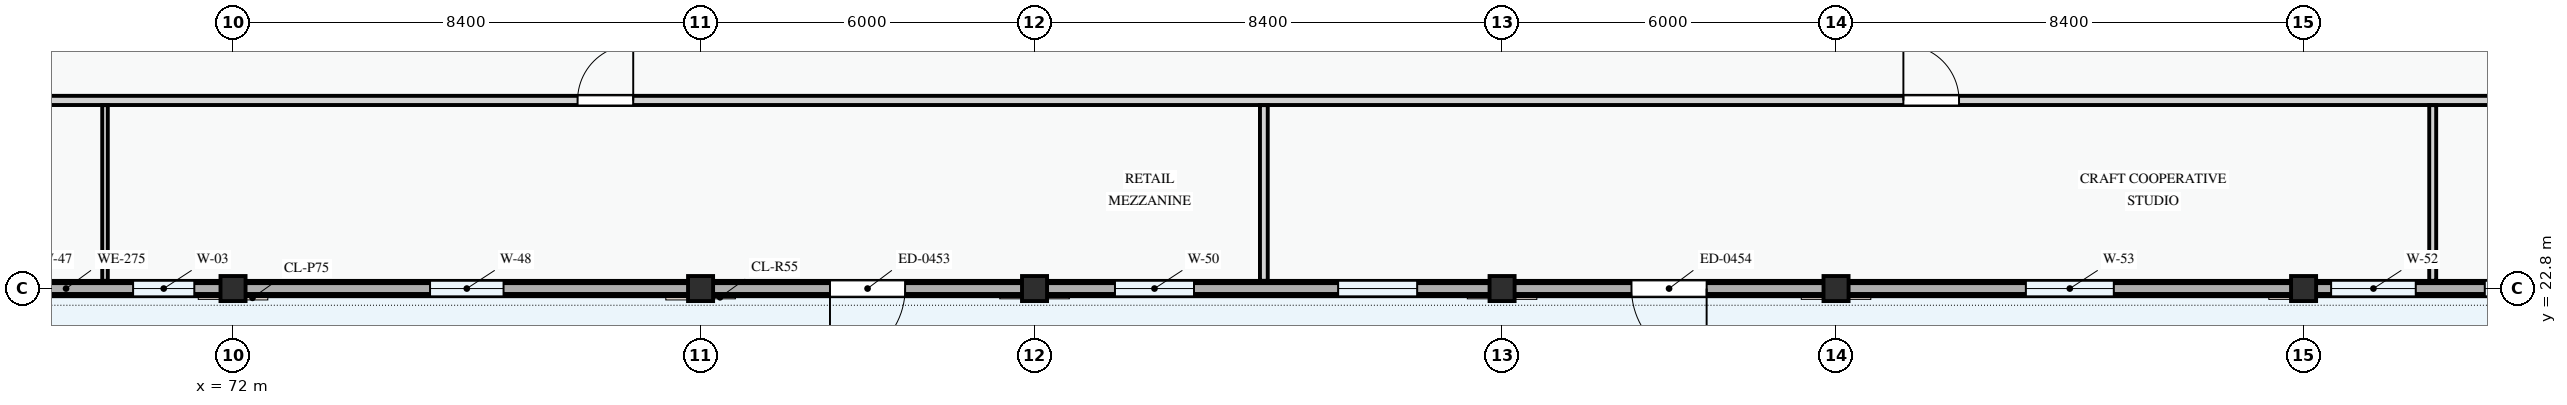
"""IFC4 building model, lengths in metres.
Left out: names, types, materials, properties, quantities, classifications, styles, units other than length and angle.
Written with IfcOpenShell. Run it as: python <this file> out.ifc"""

import sys

from ifc_helpers import new_model, si_unit, direction, frame, frame_2d, origin, origin_2d, place, context, subcontext, project, spatial, rectangle, extrude, element, fill, save


model = new_model("IFC4")
c1 = context("Model", 3, precision=1e-05, world=origin(), true_north=direction((0.0, 1.0)))
c2 = subcontext(c1, "Body", "Model", "MODEL_VIEW")
j1 = project(units=[si_unit("LENGTHUNIT", "METRE"), si_unit("PLANEANGLEUNIT", "RADIAN")], contexts=[c1])
p1 = place(None, origin())
s1 = spatial("IfcSite", under=j1, at=p1, CompositionType="ELEMENT")
p2 = place(p1, origin())
s2 = spatial("IfcBuilding", under=s1, at=p2, CompositionType="ELEMENT")
p3 = place(p2, frame((0.0, 0.0, 4.5)))
s3 = spatial("IfcBuildingStorey", under=s2, at=p3, CompositionType="ELEMENT", Elevation=4.5)
for number, where, z_axis, x_axis in (
    (1, (72.0, 22.8, 0.0), (0.0, 0.0, 1.0), (1.0, 0.0, 0.0)),
    (2, (80.4, 22.8, 0.0), (0.0, 0.0, 1.0), (1.0, 0.0, 0.0)),
    (3, (86.4, 22.8, 0.0), (0.0, 0.0, 1.0), (1.0, 0.0, 0.0)),
    (4, (94.8, 22.8, 0.0), (0.0, 0.0, 1.0), (1.0, 0.0, 0.0)),
    (5, (100.8, 22.8, 0.0), (0.0, 0.0, 1.0), (1.0, 0.0, 0.0)),
    (6, (109.2, 22.8, 0.0), (0.0, 0.0, 1.0), (1.0, 0.0, 0.0)),
):
    element("IfcColumn", number, at=place(p3, frame(where, z_axis=z_axis, x_axis=x_axis)), inside=s3, PredefinedType="COLUMN", context=c2, shape_type="SweptSolid", body=[
        extrude(rectangle(XDim=0.45, YDim=0.45, at=origin_2d()), origin(), (0.0, 0.0, 1.0), 3.6),
    ])
p4 = place(p3, frame((66.0, 22.8, 0.0), z_axis=(0.0, 0.0, 1.0), x_axis=(1.0, 0.0, 0.0)))
e7 = element("IfcWall", 7, at=p4, inside=s3, PredefinedType="STANDARD", context=c2, shape_type="SweptSolid", body=[
    extrude(rectangle(XDim=6.0, YDim=0.275, at=frame_2d((3.0, 0.0))), origin(), (0.0, 0.0, 1.0), 2.775),
])
p5 = place(p4, frame((1.32, 0.0, 0.8)))
e8 = element("IfcOpeningElement", 8, at=p5, cuts=e7, PredefinedType="OPENING", context=c2, shape_type="SweptSolid", body=[
    extrude(rectangle(XDim=1.25, YDim=1.45, at=frame_2d((0.625, 0.725))), frame((0.0, 0.147, 0.0), z_axis=(0.0, -1.0, 0.0), x_axis=(1.0, 0.0, 0.0)), (0.0, 0.0, 1.0), 0.295),
])
p6 = place(p4, frame((4.205, 0.0, 0.8)))
e9 = element("IfcOpeningElement", 9, at=p6, cuts=e7, PredefinedType="OPENING", context=c2, shape_type="SweptSolid", body=[
    extrude(rectangle(XDim=1.1, YDim=1.3, at=frame_2d((0.55, 0.65))), frame((0.0, 0.147, 0.0), z_axis=(0.0, -1.0, 0.0), x_axis=(1.0, 0.0, 0.0)), (0.0, 0.0, 1.0), 0.295),
])
p7 = place(p3, frame((72.0, 22.8, 0.0), z_axis=(0.0, 0.0, 1.0), x_axis=(1.0, 0.0, 0.0)))
e10 = element("IfcWall", 10, at=p7, inside=s3, PredefinedType="STANDARD", context=c2, shape_type="SweptSolid", body=[
    extrude(rectangle(XDim=8.4, YDim=0.275, at=frame_2d((4.2, 0.0))), origin(), (0.0, 0.0, 1.0), 2.675),
])
p8 = place(p7, frame((3.54, 0.0, 0.8)))
e11 = element("IfcOpeningElement", 11, at=p8, cuts=e10, PredefinedType="OPENING", context=c2, shape_type="SweptSolid", body=[
    extrude(rectangle(XDim=1.32, YDim=1.35, at=frame_2d((0.66, 0.675))), frame((0.0, 0.147, 0.0), z_axis=(0.0, -1.0, 0.0), x_axis=(1.0, 0.0, 0.0)), (0.0, 0.0, 1.0), 0.295),
])
p9 = place(p3, frame((80.4, 22.8, 0.0), z_axis=(0.0, 0.0, 1.0), x_axis=(1.0, 0.0, 0.0)))
e12 = element("IfcWall", 12, at=p9, inside=s3, PredefinedType="STANDARD", context=c2, shape_type="SweptSolid", body=[
    extrude(rectangle(XDim=6.0, YDim=0.275, at=frame_2d((3.0, 0.0))), origin(), (0.0, 0.0, 1.0), 2.775),
])
p10 = place(p9, frame((2.325, 0.0, 0.0)))
e13 = element("IfcOpeningElement", 13, at=p10, cuts=e12, PredefinedType="OPENING", context=c2, shape_type="SweptSolid", body=[
    extrude(rectangle(XDim=1.35, YDim=2.2, at=frame_2d((0.675, 1.1))), frame((0.0, 0.147, 0.0), z_axis=(0.0, -1.0, 0.0), x_axis=(1.0, 0.0, 0.0)), (0.0, 0.0, 1.0), 0.295),
])
p11 = place(p3, frame((86.4, 22.8, 0.0), z_axis=(0.0, 0.0, 1.0), x_axis=(1.0, 0.0, 0.0)))
e14 = element("IfcWall", 14, at=p11, inside=s3, PredefinedType="STANDARD", context=c2, shape_type="SweptSolid", body=[
    extrude(rectangle(XDim=8.4, YDim=0.275, at=frame_2d((4.2, 0.0))), origin(), (0.0, 0.0, 1.0), 2.675),
])
p12 = place(p11, frame((1.445, 0.0, 0.8)))
e15 = element("IfcOpeningElement", 15, at=p12, cuts=e14, PredefinedType="OPENING", context=c2, shape_type="SweptSolid", body=[
    extrude(rectangle(XDim=1.42, YDim=1.38, at=frame_2d((0.71, 0.69))), frame((0.0, 0.147, 0.0), z_axis=(0.0, -1.0, 0.0), x_axis=(1.0, 0.0, 0.0)), (0.0, 0.0, 1.0), 0.295),
])
p13 = place(p11, frame((5.455, 0.0, 0.8)))
e16 = element("IfcOpeningElement", 16, at=p13, cuts=e14, PredefinedType="OPENING", context=c2, shape_type="SweptSolid", body=[
    extrude(rectangle(XDim=1.42, YDim=1.38, at=frame_2d((0.71, 0.69))), frame((0.0, 0.147, 0.0), z_axis=(0.0, -1.0, 0.0), x_axis=(1.0, 0.0, 0.0)), (0.0, 0.0, 1.0), 0.295),
])
p14 = place(p3, frame((94.8, 22.8, 0.0), z_axis=(0.0, 0.0, 1.0), x_axis=(1.0, 0.0, 0.0)))
e17 = element("IfcWall", 17, at=p14, inside=s3, PredefinedType="STANDARD", context=c2, shape_type="SweptSolid", body=[
    extrude(rectangle(XDim=6.0, YDim=0.275, at=frame_2d((3.0, 0.0))), origin(), (0.0, 0.0, 1.0), 2.775),
])
p15 = place(p14, frame((2.325, 0.0, 0.0)))
e18 = element("IfcOpeningElement", 18, at=p15, cuts=e17, PredefinedType="OPENING", context=c2, shape_type="SweptSolid", body=[
    extrude(rectangle(XDim=1.35, YDim=2.2, at=frame_2d((0.675, 1.1))), frame((0.0, 0.147, 0.0), z_axis=(0.0, -1.0, 0.0), x_axis=(1.0, 0.0, 0.0)), (0.0, 0.0, 1.0), 0.295),
])
p16 = place(p3, frame((100.8, 22.8, 0.0), z_axis=(0.0, 0.0, 1.0), x_axis=(1.0, 0.0, 0.0)))
e19 = element("IfcWall", 19, at=p16, inside=s3, PredefinedType="STANDARD", context=c2, shape_type="SweptSolid", body=[
    extrude(rectangle(XDim=8.4, YDim=0.275, at=frame_2d((4.2, 0.0))), origin(), (0.0, 0.0, 1.0), 2.675),
])
p17 = place(p16, frame((3.41, 0.0, 0.8)))
e20 = element("IfcOpeningElement", 20, at=p17, cuts=e19, PredefinedType="OPENING", context=c2, shape_type="SweptSolid", body=[
    extrude(rectangle(XDim=1.58, YDim=1.48, at=frame_2d((0.79, 0.74))), frame((0.0, 0.147, 0.0), z_axis=(0.0, -1.0, 0.0), x_axis=(1.0, 0.0, 0.0)), (0.0, 0.0, 1.0), 0.295),
])
p18 = place(p3, frame((109.2, 22.8, 0.0), z_axis=(0.0, 0.0, 1.0), x_axis=(1.0, 0.0, 0.0)))
e21 = element("IfcWall", 21, at=p18, inside=s3, PredefinedType="STANDARD", context=c2, shape_type="SweptSolid", body=[
    extrude(rectangle(XDim=6.0, YDim=0.275, at=frame_2d((3.0, 0.0))), origin(), (0.0, 0.0, 1.0), 2.775),
])
p19 = place(p18, frame((0.495, 0.0, 0.8)))
e22 = element("IfcOpeningElement", 22, at=p19, cuts=e21, PredefinedType="OPENING", context=c2, shape_type="SweptSolid", body=[
    extrude(rectangle(XDim=1.52, YDim=1.42, at=frame_2d((0.76, 0.71))), frame((0.0, 0.147, 0.0), z_axis=(0.0, -1.0, 0.0), x_axis=(1.0, 0.0, 0.0)), (0.0, 0.0, 1.0), 0.295),
])
p20 = place(p18, frame((3.255, 0.0, 0.8)))
e23 = element("IfcOpeningElement", 23, at=p20, cuts=e21, PredefinedType="OPENING", context=c2, shape_type="SweptSolid", body=[
    extrude(rectangle(XDim=1.62, YDim=1.38, at=frame_2d((0.81, 0.69))), frame((0.0, 0.147, 0.0), z_axis=(0.0, -1.0, 0.0), x_axis=(1.0, 0.0, 0.0)), (0.0, 0.0, 1.0), 0.295),
])
p21 = place(p3, frame((66.0, 22.8, 3.6), z_axis=(0.0, 0.0, 1.0), x_axis=(1.0, 0.0, 0.0)))
e24 = element("IfcWall", 24, at=p21, inside=s3, PredefinedType="PARAPET", context=c2, shape_type="SweptSolid", body=[
    extrude(rectangle(XDim=49.2, YDim=0.195, at=frame_2d((24.6, 0.0))), origin(), (0.0, 0.0, 1.0), 1.15),
])
p22 = place(p3, frame((66.139, 26.18, 0.0), z_axis=(0.0, 0.0, 1.0), x_axis=(1.0, 0.0, 0.0)))
e25 = element("IfcWall", 25, at=p22, inside=s3, PredefinedType="PARTITIONING", context=c2, shape_type="SweptSolid", body=[
    extrude(rectangle(XDim=48.921, YDim=0.165, at=frame_2d((24.46, 0.0))), origin(), (0.0, 0.0, 1.0), 3.3),
])
p23 = place(p22, frame((12.051, 0.0, 0.0)))
e26 = element("IfcOpeningElement", 26, at=p23, cuts=e25, PredefinedType="OPENING", context=c2, shape_type="SweptSolid", body=[
    extrude(rectangle(XDim=1.0, YDim=2.1, at=frame_2d((0.5, 1.05))), frame((0.0, 0.093, 0.0), z_axis=(0.0, -1.0, 0.0), x_axis=(1.0, 0.0, 0.0)), (0.0, 0.0, 1.0), 0.185),
])
p24 = place(p22, frame((35.871, 0.0, 0.0)))
e27 = element("IfcOpeningElement", 27, at=p24, cuts=e25, PredefinedType="OPENING", context=c2, shape_type="SweptSolid", body=[
    extrude(rectangle(XDim=1.0, YDim=2.1, at=frame_2d((0.5, 1.05))), frame((0.0, 0.093, 0.0), z_axis=(0.0, -1.0, 0.0), x_axis=(1.0, 0.0, 0.0)), (0.0, 0.0, 1.0), 0.185),
])
p25 = place(p3, frame((69.7, 22.939, 0.0), z_axis=(0.0, 0.0, 1.0), x_axis=(0.0, 1.0, 0.0)))
e28 = element("IfcWall", 28, at=p25, inside=s3, PredefinedType="PARTITIONING", context=c2, shape_type="SweptSolid", body=[
    extrude(rectangle(XDim=3.156, YDim=0.1, at=frame_2d((1.578, 0.0))), origin(), (0.0, 0.0, 1.0), 3.3),
])
p26 = place(p3, frame((90.52, 22.939, 0.0), z_axis=(0.0, 0.0, 1.0), x_axis=(0.0, 1.0, 0.0)))
e29 = element("IfcWall", 29, at=p26, inside=s3, PredefinedType="PARTITIONING", context=c2, shape_type="SweptSolid", body=[
    extrude(rectangle(XDim=3.156, YDim=0.14, at=frame_2d((1.578, 0.0))), origin(), (0.0, 0.0, 1.0), 3.3),
])
p27 = place(p3, frame((111.52, 22.939, 0.0), z_axis=(0.0, 0.0, 1.0), x_axis=(0.0, 1.0, 0.0)))
e30 = element("IfcWall", 30, at=p27, inside=s3, PredefinedType="PARTITIONING", context=c2, shape_type="SweptSolid", body=[
    extrude(rectangle(XDim=3.156, YDim=0.125, at=frame_2d((1.578, 0.0))), origin(), (0.0, 0.0, 1.0), 3.3),
])
p28 = place(p6, origin())
e31 = element("IfcWindow", 31, at=p28, inside=s3, PartitioningType="SINGLE_PANEL", PredefinedType="WINDOW", context=c2, shape_type="SweptSolid", body=[
    extrude(rectangle(XDim=1.1, YDim=1.3, at=frame_2d((0.55, 0.65))), frame((0.0, 0.03, 0.0), z_axis=(0.0, -1.0, 0.0), x_axis=(1.0, 0.0, 0.0)), (0.0, 0.0, 1.0), 0.06),
])
fill(e9, e31)
p29 = place(p8, origin())
e32 = element("IfcWindow", 32, at=p29, inside=s3, PartitioningType="SINGLE_PANEL", PredefinedType="WINDOW", context=c2, shape_type="SweptSolid", body=[
    extrude(rectangle(XDim=1.32, YDim=1.35, at=frame_2d((0.66, 0.675))), frame((0.0, 0.03, 0.0), z_axis=(0.0, -1.0, 0.0), x_axis=(1.0, 0.0, 0.0)), (0.0, 0.0, 1.0), 0.06),
])
fill(e11, e32)
p30 = place(p10, frame((1.35, 0.0, 0.0), z_axis=(0.0, 0.0, 1.0), x_axis=(-1.0, 0.0, 0.0)))
e33 = element("IfcDoor", 33, at=p30, inside=s3, OperationType="SINGLE_SWING_RIGHT", PredefinedType="DOOR", context=c2, shape_type="SweptSolid", body=[
    extrude(rectangle(XDim=1.35, YDim=2.2, at=frame_2d((0.675, 1.1))), frame((0.0, 0.025, 0.0), z_axis=(0.0, -1.0, 0.0), x_axis=(1.0, 0.0, 0.0)), (0.0, 0.0, 1.0), 0.05),
])
fill(e13, e33)
p31 = place(p12, origin())
e34 = element("IfcWindow", 34, at=p31, inside=s3, PartitioningType="SINGLE_PANEL", PredefinedType="WINDOW", context=c2, shape_type="SweptSolid", body=[
    extrude(rectangle(XDim=1.42, YDim=1.38, at=frame_2d((0.71, 0.69))), frame((0.0, 0.03, 0.0), z_axis=(0.0, -1.0, 0.0), x_axis=(1.0, 0.0, 0.0)), (0.0, 0.0, 1.0), 0.06),
])
fill(e15, e34)
p32 = place(p13, origin())
e35 = element("IfcWindow", 35, at=p32, inside=s3, PartitioningType="SINGLE_PANEL", PredefinedType="WINDOW", context=c2, shape_type="SweptSolid", body=[
    extrude(rectangle(XDim=1.42, YDim=1.38, at=frame_2d((0.71, 0.69))), frame((0.0, 0.03, 0.0), z_axis=(0.0, -1.0, 0.0), x_axis=(1.0, 0.0, 0.0)), (0.0, 0.0, 1.0), 0.06),
])
fill(e16, e35)
p33 = place(p15, frame((1.35, 0.0, 0.0), z_axis=(0.0, 0.0, 1.0), x_axis=(-1.0, 0.0, 0.0)))
e36 = element("IfcDoor", 36, at=p33, inside=s3, OperationType="SINGLE_SWING_LEFT", PredefinedType="DOOR", context=c2, shape_type="SweptSolid", body=[
    extrude(rectangle(XDim=1.35, YDim=2.2, at=frame_2d((0.675, 1.1))), frame((0.0, 0.025, 0.0), z_axis=(0.0, -1.0, 0.0), x_axis=(1.0, 0.0, 0.0)), (0.0, 0.0, 1.0), 0.05),
])
fill(e18, e36)
p34 = place(p17, origin())
e37 = element("IfcWindow", 37, at=p34, inside=s3, PartitioningType="SINGLE_PANEL", PredefinedType="WINDOW", context=c2, shape_type="SweptSolid", body=[
    extrude(rectangle(XDim=1.58, YDim=1.48, at=frame_2d((0.79, 0.74))), frame((0.0, 0.03, 0.0), z_axis=(0.0, -1.0, 0.0), x_axis=(1.0, 0.0, 0.0)), (0.0, 0.0, 1.0), 0.06),
])
fill(e20, e37)
p35 = place(p19, origin())
e38 = element("IfcWindow", 38, at=p35, inside=s3, PartitioningType="SINGLE_PANEL", PredefinedType="WINDOW", context=c2, shape_type="SweptSolid", body=[
    extrude(rectangle(XDim=1.52, YDim=1.42, at=frame_2d((0.76, 0.71))), frame((0.0, 0.03, 0.0), z_axis=(0.0, -1.0, 0.0), x_axis=(1.0, 0.0, 0.0)), (0.0, 0.0, 1.0), 0.06),
])
fill(e22, e38)
p36 = place(p20, origin())
e39 = element("IfcWindow", 39, at=p36, inside=s3, PartitioningType="DOUBLE_PANEL_VERTICAL", PredefinedType="WINDOW", context=c2, shape_type="SweptSolid", body=[
    extrude(rectangle(XDim=1.62, YDim=1.38, at=frame_2d((0.81, 0.69))), frame((0.0, 0.03, 0.0), z_axis=(0.0, -1.0, 0.0), x_axis=(1.0, 0.0, 0.0)), (0.0, 0.0, 1.0), 0.06),
])
fill(e23, e39)
p37 = place(p23, origin())
e40 = element("IfcDoor", 40, at=p37, inside=s3, OperationType="SINGLE_SWING_RIGHT", PredefinedType="DOOR", context=c2, shape_type="SweptSolid", body=[
    extrude(rectangle(XDim=1.0, YDim=2.1, at=frame_2d((0.5, 1.05))), frame((0.0, 0.025, 0.0), z_axis=(0.0, -1.0, 0.0), x_axis=(1.0, 0.0, 0.0)), (0.0, 0.0, 1.0), 0.05),
])
fill(e26, e40)
p38 = place(p24, origin())
e41 = element("IfcDoor", 41, at=p38, inside=s3, OperationType="SINGLE_SWING_LEFT", PredefinedType="DOOR", context=c2, shape_type="SweptSolid", body=[
    extrude(rectangle(XDim=1.0, YDim=2.1, at=frame_2d((0.5, 1.05))), frame((0.0, 0.025, 0.0), z_axis=(0.0, -1.0, 0.0), x_axis=(1.0, 0.0, 0.0)), (0.0, 0.0, 1.0), 0.05),
])
fill(e27, e41)
save(model, sys.argv[1])
